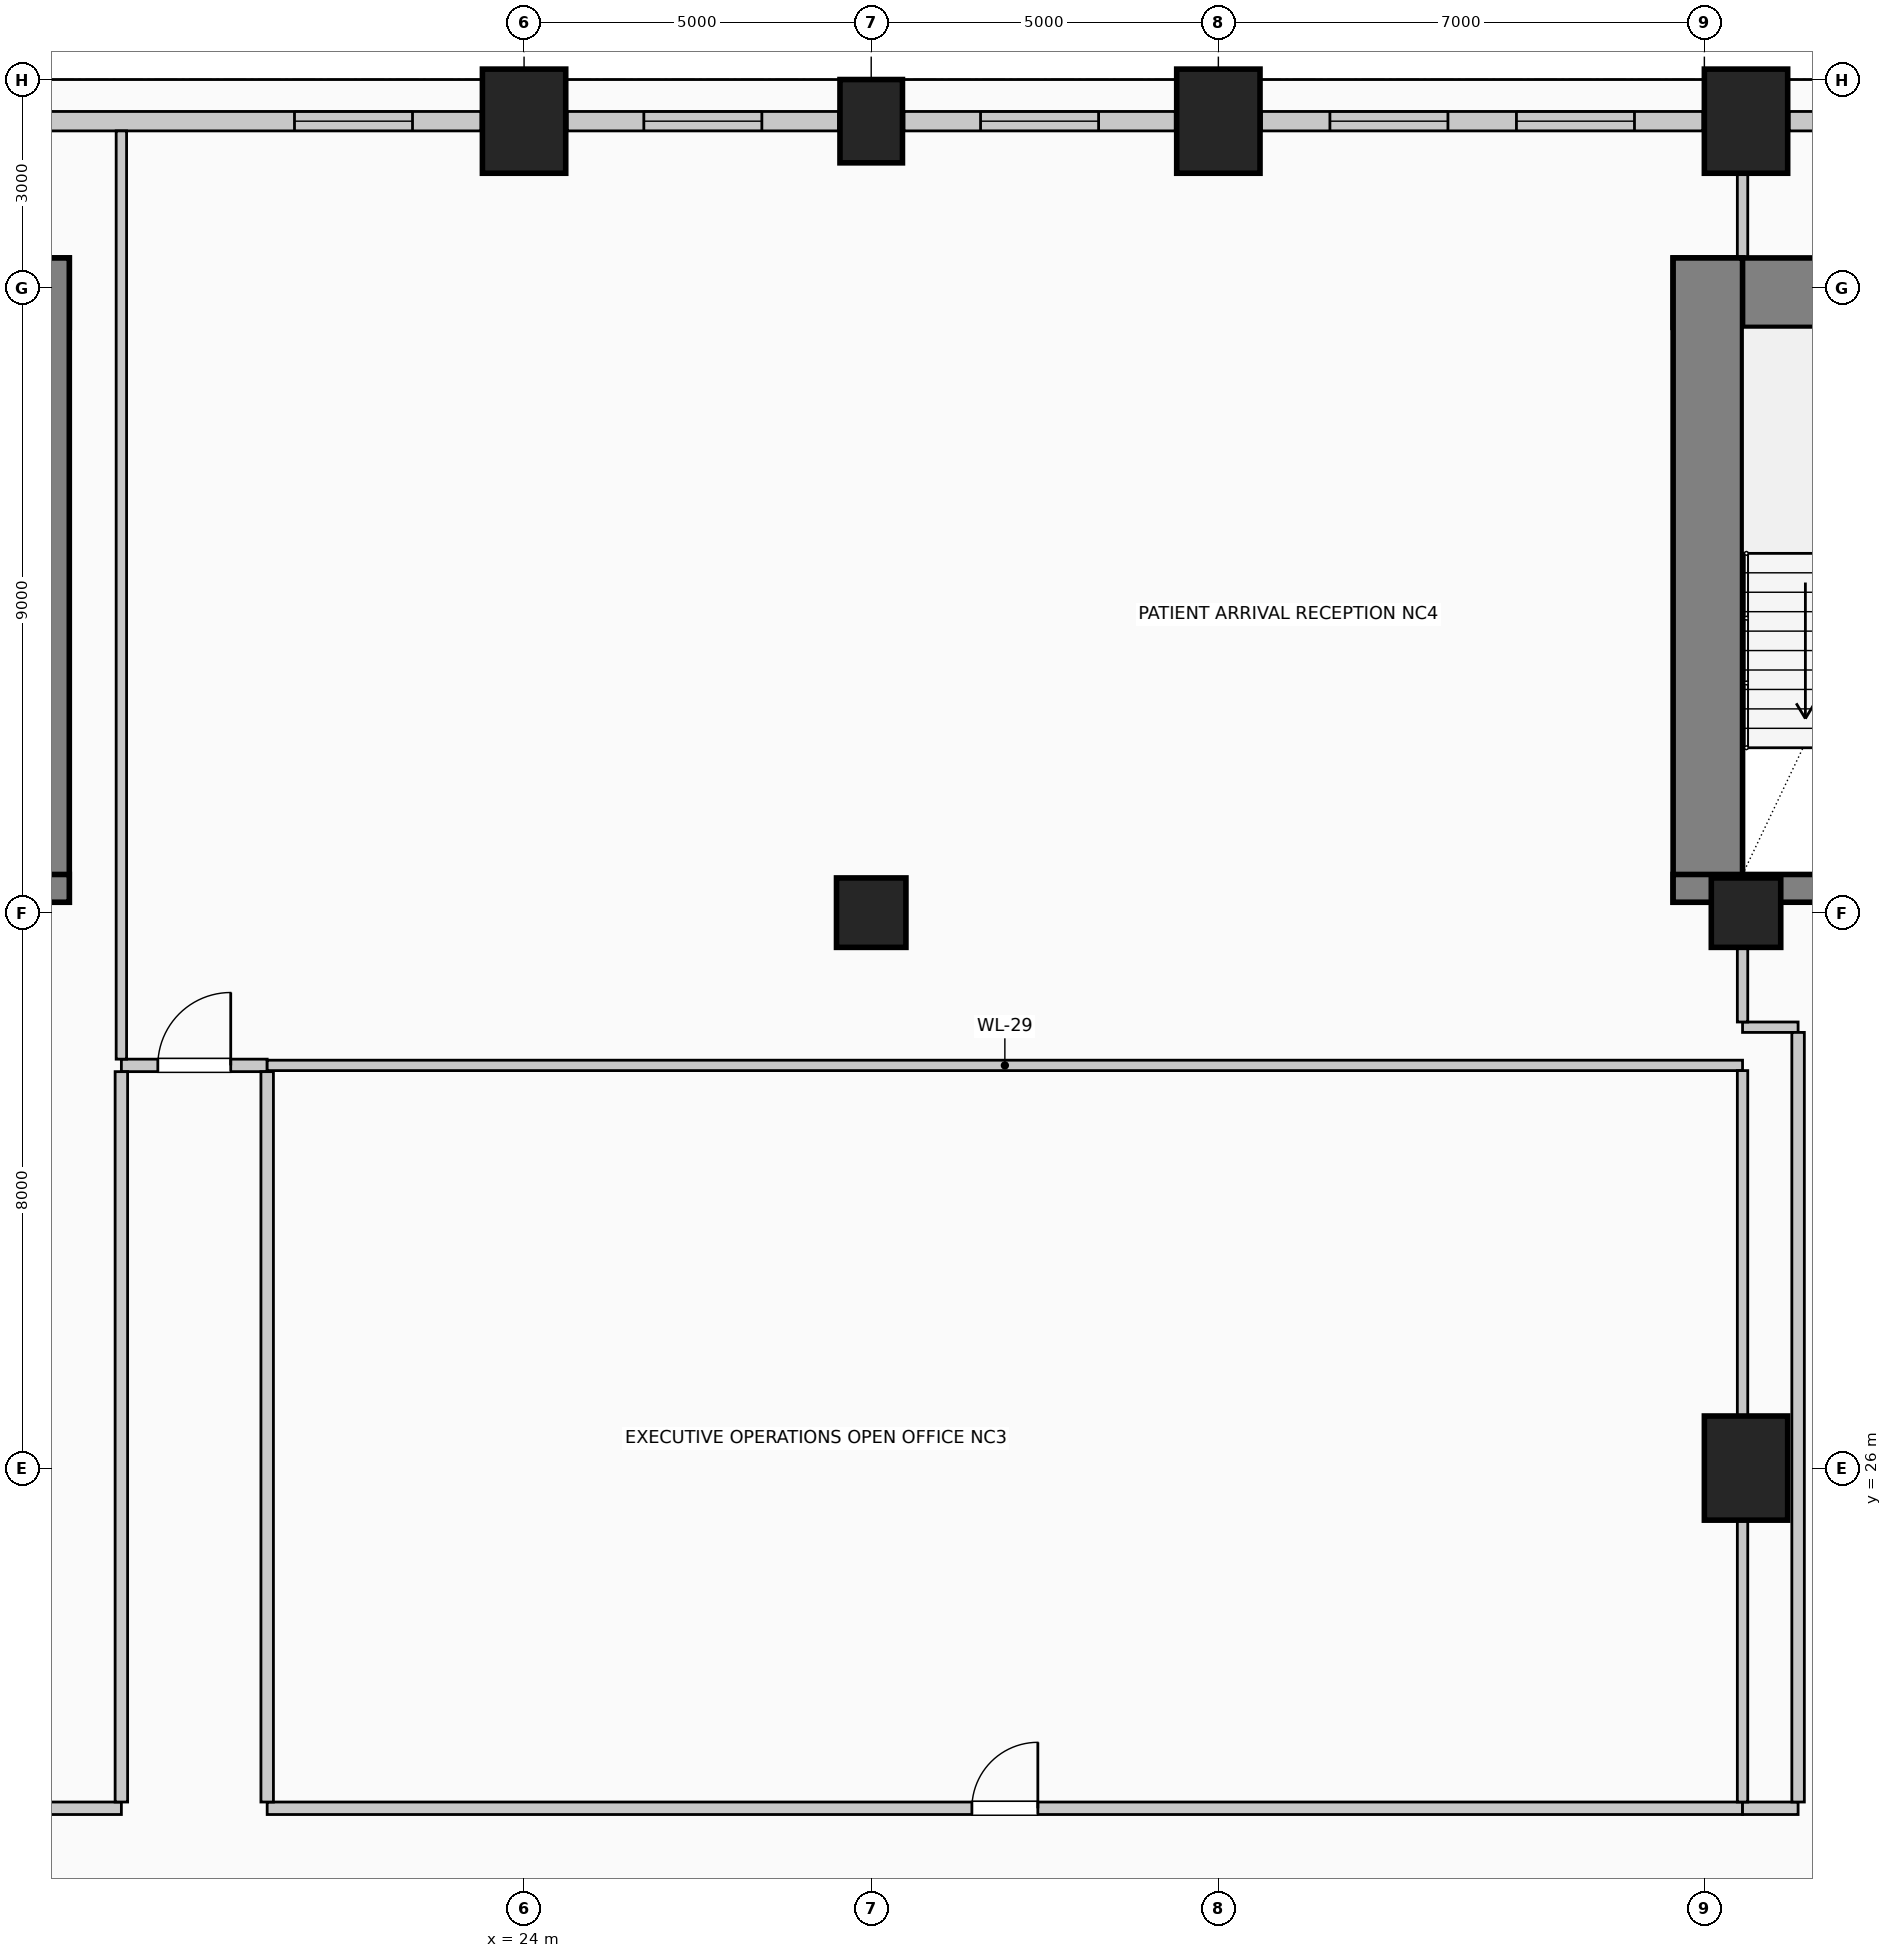
"""IFC4 building model, lengths in metres.
Left out: names, types, materials, properties, quantities, classifications, styles, units other than length and angle.
Written with IfcOpenShell. Run it as: python <this file> out.ifc"""

import sys

from ifc_helpers import new_model, si_unit, direction, frame, frame_2d, origin, origin_2d, place, context, subcontext, project, spatial, rectangle, circle, extrude, element, fill, save


model = new_model("IFC4")
c1 = context("Model", 3, precision=1e-05, world=origin(), true_north=direction((0.0, 1.0)))
c2 = subcontext(c1, "Body", "Model", "MODEL_VIEW")
j1 = project(units=[si_unit("LENGTHUNIT", "METRE"), si_unit("PLANEANGLEUNIT", "RADIAN")], contexts=[c1])
p1 = place(None, origin())
s1 = spatial("IfcSite", under=j1, at=p1, CompositionType="ELEMENT")
p2 = place(p1, origin())
s2 = spatial("IfcBuilding", under=s1, at=p2, CompositionType="ELEMENT")
p3 = place(p2, frame((0.0, 0.0, 46.6)))
s3 = spatial("IfcBuildingStorey", under=s2, at=p3, CompositionType="ELEMENT", Elevation=46.6)
p4 = place(p3, frame((2.55, 42.93, 0.0), z_axis=(0.0, 0.0, 1.0), x_axis=(1.0, 0.0, 0.0)))
e1 = element("IfcWall", 1, at=p4, inside=s3, PredefinedType="SHEAR", context=c2, shape_type="SweptSolid", body=[
    extrude(rectangle(XDim=14.9, YDim=1.0, at=frame_2d((7.45, 0.0))), origin(), (0.0, 0.0, 1.0), 4.0),
])
p5 = place(p3, frame((16.95, 34.15, 0.0), z_axis=(0.0, 0.0, 1.0), x_axis=(0.0, 1.0, 0.0)))
e2 = element("IfcWall", 2, at=p5, inside=s3, PredefinedType="SHEAR", context=c2, shape_type="SweptSolid", body=[
    extrude(rectangle(XDim=9.28, YDim=1.0, at=frame_2d((4.64, 0.0))), origin(), (0.0, 0.0, 1.0), 4.0),
])
p6 = place(p3, frame((12.29, 34.35, 0.0), z_axis=(0.0, 0.0, 1.0), x_axis=(1.0, 0.0, 0.0)))
e3 = element("IfcWall", 3, at=p6, inside=s3, PredefinedType="SHEAR", context=c2, shape_type="SweptSolid", body=[
    extrude(rectangle(XDim=5.16, YDim=0.4, at=frame_2d((2.58, 0.0))), origin(), (0.0, 0.0, 1.0), 4.0),
])
p7 = place(p6, frame((1.4, 0.0, 0.0)))
e4 = element("IfcOpeningElement", 4, at=p7, cuts=e3, PredefinedType="OPENING", context=c2, shape_type="SweptSolid", body=[
    extrude(rectangle(XDim=1.15, YDim=2.2, at=frame_2d((0.575, 1.1))), frame((0.0, 0.21, 0.0), z_axis=(0.0, -1.0, 0.0), x_axis=(1.0, 0.0, 0.0)), (0.0, 0.0, 1.0), 0.42),
])
p8 = place(p3, frame((40.55, 42.93, 0.0), z_axis=(0.0, 0.0, 1.0), x_axis=(1.0, 0.0, 0.0)))
e5 = element("IfcWall", 5, at=p8, inside=s3, PredefinedType="SHEAR", context=c2, shape_type="SweptSolid", body=[
    extrude(rectangle(XDim=14.9, YDim=1.0, at=frame_2d((7.45, 0.0))), origin(), (0.0, 0.0, 1.0), 4.0),
])
p9 = place(p3, frame((41.05, 34.15, 0.0), z_axis=(0.0, 0.0, 1.0), x_axis=(0.0, 1.0, 0.0)))
e6 = element("IfcWall", 6, at=p9, inside=s3, PredefinedType="SHEAR", context=c2, shape_type="SweptSolid", body=[
    extrude(rectangle(XDim=9.28, YDim=1.0, at=frame_2d((4.64, 0.0))), origin(), (0.0, 0.0, 1.0), 4.0),
])
p10 = place(p3, frame((40.55, 34.35, 0.0), z_axis=(0.0, 0.0, 1.0), x_axis=(1.0, 0.0, 0.0)))
e7 = element("IfcWall", 7, at=p10, inside=s3, PredefinedType="SHEAR", context=c2, shape_type="SweptSolid", body=[
    extrude(rectangle(XDim=5.16, YDim=0.4, at=frame_2d((2.58, 0.0))), origin(), (0.0, 0.0, 1.0), 4.0),
])
p11 = place(p10, frame((2.4, 0.0, 0.0)))
e8 = element("IfcOpeningElement", 8, at=p11, cuts=e7, PredefinedType="OPENING", context=c2, shape_type="SweptSolid", body=[
    extrude(rectangle(XDim=1.15, YDim=2.2, at=frame_2d((0.575, 1.1))), frame((0.0, 0.21, 0.0), z_axis=(0.0, -1.0, 0.0), x_axis=(1.0, 0.0, 0.0)), (0.0, 0.0, 1.0), 0.42),
])
p12 = place(p3, frame((24.0, 45.4, 0.0), z_axis=(0.0, 0.0, 1.0), x_axis=(1.0, 0.0, 0.0)))
e9 = element("IfcColumn", 9, at=p12, inside=s3, PredefinedType="COLUMN", context=c2, shape_type="SweptSolid", body=[
    extrude(rectangle(XDim=1.2, YDim=1.5, at=origin_2d()), origin(), (0.0, 0.0, 1.0), 4.0),
])
p13 = place(p3, frame((29.0, 45.4, 0.0), z_axis=(0.0, 0.0, 1.0), x_axis=(1.0, 0.0, 0.0)))
e10 = element("IfcColumn", 10, at=p13, inside=s3, PredefinedType="COLUMN", context=c2, shape_type="SweptSolid", body=[
    extrude(rectangle(XDim=0.9, YDim=1.2, at=origin_2d()), origin(), (0.0, 0.0, 1.0), 4.0),
])
for number, where, z_axis, x_axis in (
    (11, (34.0, 45.4, 0.0), (0.0, 0.0, 1.0), (1.0, 0.0, 0.0)),
    (12, (41.6, 45.4, 0.0), (0.0, 0.0, 1.0), (1.0, 0.0, 0.0)),
    (13, (41.6, 26.0, 0.0), (0.0, 0.0, 1.0), (1.0, 0.0, 0.0)),
):
    element("IfcColumn", number, at=place(p3, frame(where, z_axis=z_axis, x_axis=x_axis)), inside=s3, PredefinedType="COLUMN", context=c2, shape_type="SweptSolid", body=[
        extrude(rectangle(XDim=1.2, YDim=1.5, at=origin_2d()), origin(), (0.0, 0.0, 1.0), 4.0),
    ])
for number, where, z_axis, x_axis in (
    (14, (29.0, 34.0, 0.0), (0.0, 0.0, 1.0), (1.0, 0.0, 0.0)),
    (15, (41.6, 34.0, 0.0), (0.0, 0.0, 1.0), (1.0, 0.0, 0.0)),
):
    element("IfcColumn", number, at=place(p3, frame(where, z_axis=z_axis, x_axis=x_axis)), inside=s3, PredefinedType="COLUMN", context=c2, shape_type="SweptSolid", body=[
        extrude(circle(Radius=0.5, at=origin_2d()), origin(), (0.0, 0.0, 1.0), 4.0),
    ])
p14 = place(p3, frame((17.02, 45.4, 0.0), z_axis=(0.0, 0.0, 1.0), x_axis=(1.0, 0.0, 0.0)))
e16 = element("IfcWall", 16, at=p14, inside=s3, PredefinedType="SOLIDWALL", context=c2, shape_type="SweptSolid", body=[
    extrude(rectangle(XDim=6.36, YDim=0.28, at=frame_2d((3.18, 0.0))), origin(), (0.0, 0.0, 1.0), 2.85),
])
p15 = place(p14, frame((3.673, 0.0, 0.5)))
e17 = element("IfcOpeningElement", 17, at=p15, cuts=e16, PredefinedType="OPENING", context=c2, shape_type="SweptSolid", body=[
    extrude(rectangle(XDim=1.7, YDim=1.95, at=frame_2d((0.85, 0.975))), frame((0.0, 0.15, 0.0), z_axis=(0.0, -1.0, 0.0), x_axis=(1.0, 0.0, 0.0)), (0.0, 0.0, 1.0), 0.3),
])
p16 = place(p3, frame((24.62, 45.4, 0.0), z_axis=(0.0, 0.0, 1.0), x_axis=(1.0, 0.0, 0.0)))
e18 = element("IfcWall", 18, at=p16, inside=s3, PredefinedType="SOLIDWALL", context=c2, shape_type="SweptSolid", body=[
    extrude(rectangle(XDim=3.91, YDim=0.28, at=frame_2d((1.955, 0.0))), origin(), (0.0, 0.0, 1.0), 2.85),
])
p17 = place(p16, frame((1.105, 0.0, 0.5)))
e19 = element("IfcOpeningElement", 19, at=p17, cuts=e18, PredefinedType="OPENING", context=c2, shape_type="SweptSolid", body=[
    extrude(rectangle(XDim=1.7, YDim=1.95, at=frame_2d((0.85, 0.975))), frame((0.0, 0.15, 0.0), z_axis=(0.0, -1.0, 0.0), x_axis=(1.0, 0.0, 0.0)), (0.0, 0.0, 1.0), 0.3),
])
p18 = place(p3, frame((29.47, 45.4, 0.0), z_axis=(0.0, 0.0, 1.0), x_axis=(1.0, 0.0, 0.0)))
e20 = element("IfcWall", 20, at=p18, inside=s3, PredefinedType="SOLIDWALL", context=c2, shape_type="SweptSolid", body=[
    extrude(rectangle(XDim=3.91, YDim=0.28, at=frame_2d((1.955, 0.0))), origin(), (0.0, 0.0, 1.0), 2.85),
])
p19 = place(p18, frame((1.105, 0.0, 0.5)))
e21 = element("IfcOpeningElement", 21, at=p19, cuts=e20, PredefinedType="OPENING", context=c2, shape_type="SweptSolid", body=[
    extrude(rectangle(XDim=1.7, YDim=1.95, at=frame_2d((0.85, 0.975))), frame((0.0, 0.15, 0.0), z_axis=(0.0, -1.0, 0.0), x_axis=(1.0, 0.0, 0.0)), (0.0, 0.0, 1.0), 0.3),
])
p20 = place(p3, frame((34.62, 45.4, 0.0), z_axis=(0.0, 0.0, 1.0), x_axis=(1.0, 0.0, 0.0)))
e22 = element("IfcWall", 22, at=p20, inside=s3, PredefinedType="SOLIDWALL", context=c2, shape_type="SweptSolid", body=[
    extrude(rectangle(XDim=6.36, YDim=0.28, at=frame_2d((3.18, 0.0))), origin(), (0.0, 0.0, 1.0), 2.85),
])
p21 = place(p20, frame((0.987, 0.0, 0.5)))
e23 = element("IfcOpeningElement", 23, at=p21, cuts=e22, PredefinedType="OPENING", context=c2, shape_type="SweptSolid", body=[
    extrude(rectangle(XDim=1.7, YDim=1.95, at=frame_2d((0.85, 0.975))), frame((0.0, 0.15, 0.0), z_axis=(0.0, -1.0, 0.0), x_axis=(1.0, 0.0, 0.0)), (0.0, 0.0, 1.0), 0.3),
])
p22 = place(p20, frame((3.673, 0.0, 0.5)))
e24 = element("IfcOpeningElement", 24, at=p22, cuts=e22, PredefinedType="OPENING", context=c2, shape_type="SweptSolid", body=[
    extrude(rectangle(XDim=1.7, YDim=1.95, at=frame_2d((0.85, 0.975))), frame((0.0, 0.15, 0.0), z_axis=(0.0, -1.0, 0.0), x_axis=(1.0, 0.0, 0.0)), (0.0, 0.0, 1.0), 0.3),
])
p23 = place(p3, frame((42.22, 45.4, 0.0), z_axis=(0.0, 0.0, 1.0), x_axis=(1.0, 0.0, 0.0)))
e25 = element("IfcWall", 25, at=p23, inside=s3, PredefinedType="SOLIDWALL", context=c2, shape_type="SweptSolid", body=[
    extrude(rectangle(XDim=1.31, YDim=0.28, at=frame_2d((0.655, 0.0))), origin(), (0.0, 0.0, 1.0), 2.85),
])
p24 = place(p3, frame((12.2, 21.1, 0.0), z_axis=(0.0, 0.0, 1.0), x_axis=(1.0, 0.0, 0.0)))
e26 = element("IfcWall", 26, at=p24, inside=s3, PredefinedType="PARTITIONING", context=c2, shape_type="SweptSolid", body=[
    extrude(rectangle(XDim=6.0, YDim=0.18, at=frame_2d((3.0, 0.0))), origin(), (0.0, 0.0, 1.0), 3.7),
])
p25 = place(p3, frame((20.3, 21.1, 0.0), z_axis=(0.0, 0.0, 1.0), x_axis=(1.0, 0.0, 0.0)))
e27 = element("IfcWall", 27, at=p25, inside=s3, PredefinedType="PARTITIONING", context=c2, shape_type="SweptSolid", body=[
    extrude(rectangle(XDim=21.25, YDim=0.18, at=frame_2d((10.625, 0.0))), origin(), (0.0, 0.0, 1.0), 3.7),
])
p26 = place(p25, frame((10.15, 0.0, 0.0)))
e28 = element("IfcOpeningElement", 28, at=p26, cuts=e27, PredefinedType="OPENING", context=c2, shape_type="SweptSolid", body=[
    extrude(rectangle(XDim=0.95, YDim=2.15, at=frame_2d((0.475, 1.075))), frame((0.0, 0.1, 0.0), z_axis=(0.0, -1.0, 0.0), x_axis=(1.0, 0.0, 0.0)), (0.0, 0.0, 1.0), 0.2),
])
p27 = place(p3, frame((41.55, 21.1, 0.0), z_axis=(0.0, 0.0, 1.0), x_axis=(1.0, 0.0, 0.0)))
e29 = element("IfcWall", 29, at=p27, inside=s3, PredefinedType="PARTITIONING", context=c2, shape_type="SweptSolid", body=[
    extrude(rectangle(XDim=0.8, YDim=0.18, at=frame_2d((0.4, 0.0))), origin(), (0.0, 0.0, 1.0), 3.7),
])
p28 = place(p3, frame((18.2, 31.8, 0.0), z_axis=(0.0, 0.0, 1.0), x_axis=(1.0, 0.0, 0.0)))
e30 = element("IfcWall", 30, at=p28, inside=s3, PredefinedType="PARTITIONING", context=c2, shape_type="SweptSolid", body=[
    extrude(rectangle(XDim=2.1, YDim=0.18, at=frame_2d((1.05, 0.0))), origin(), (0.0, 0.0, 1.0), 3.7),
])
p29 = place(p28, frame((0.525, 0.0, 0.0)))
e31 = element("IfcOpeningElement", 31, at=p29, cuts=e30, PredefinedType="OPENING", context=c2, shape_type="SweptSolid", body=[
    extrude(rectangle(XDim=1.05, YDim=2.15, at=frame_2d((0.525, 1.075))), frame((0.0, 0.1, 0.0), z_axis=(0.0, -1.0, 0.0), x_axis=(1.0, 0.0, 0.0)), (0.0, 0.0, 1.0), 0.2),
])
p30 = place(p3, frame((20.3, 31.8, 0.0), z_axis=(0.0, 0.0, 1.0), x_axis=(1.0, 0.0, 0.0)))
e32 = element("IfcWall", 32, at=p30, inside=s3, PredefinedType="PARTITIONING", context=c2, shape_type="SweptSolid", body=[
    extrude(rectangle(XDim=21.25, YDim=0.15, at=frame_2d((10.625, 0.0))), origin(), (0.0, 0.0, 1.0), 3.7),
])
p31 = place(p3, frame((41.55, 32.35, 0.0), z_axis=(0.0, 0.0, 1.0), x_axis=(1.0, 0.0, 0.0)))
e33 = element("IfcWall", 33, at=p31, inside=s3, PredefinedType="PARTITIONING", context=c2, shape_type="SweptSolid", body=[
    extrude(rectangle(XDim=0.8, YDim=0.15, at=frame_2d((0.4, 0.0))), origin(), (0.0, 0.0, 1.0), 3.7),
])
p32 = place(p3, frame((18.2, 21.19, 0.0), z_axis=(0.0, 0.0, 1.0), x_axis=(0.0, 1.0, 0.0)))
e34 = element("IfcWall", 34, at=p32, inside=s3, PredefinedType="PARTITIONING", context=c2, shape_type="SweptSolid", body=[
    extrude(rectangle(XDim=10.52, YDim=0.18, at=frame_2d((5.26, 0.0))), origin(), (0.0, 0.0, 1.0), 3.7),
])
p33 = place(p3, frame((18.2, 31.89, 0.0), z_axis=(0.0, 0.0, 1.0), x_axis=(0.0, 1.0, 0.0)))
e35 = element("IfcWall", 35, at=p33, inside=s3, PredefinedType="PARTITIONING", context=c2, shape_type="SweptSolid", body=[
    extrude(rectangle(XDim=13.37, YDim=0.15, at=frame_2d((6.685, 0.0))), origin(), (0.0, 0.0, 1.0), 3.7),
])
p34 = place(p3, frame((20.3, 21.19, 0.0), z_axis=(0.0, 0.0, 1.0), x_axis=(0.0, 1.0, 0.0)))
e36 = element("IfcWall", 36, at=p34, inside=s3, PredefinedType="PARTITIONING", context=c2, shape_type="SweptSolid", body=[
    extrude(rectangle(XDim=10.52, YDim=0.18, at=frame_2d((5.26, 0.0))), origin(), (0.0, 0.0, 1.0), 3.7),
])
p35 = place(p3, frame((41.55, 21.19, 0.0), z_axis=(0.0, 0.0, 1.0), x_axis=(0.0, 1.0, 0.0)))
e37 = element("IfcWall", 37, at=p35, inside=s3, PredefinedType="PARTITIONING", context=c2, shape_type="SweptSolid", body=[
    extrude(rectangle(XDim=4.06, YDim=0.15, at=frame_2d((2.03, 0.0))), origin(), (0.0, 0.0, 1.0), 2.995),
])
p36 = place(p3, frame((41.55, 26.75, 0.0), z_axis=(0.0, 0.0, 1.0), x_axis=(0.0, 1.0, 0.0)))
e38 = element("IfcWall", 38, at=p36, inside=s3, PredefinedType="PARTITIONING", context=c2, shape_type="SweptSolid", body=[
    extrude(rectangle(XDim=4.975, YDim=0.15, at=frame_2d((2.488, 0.0))), origin(), (0.0, 0.0, 1.0), 2.995),
])
p37 = place(p3, frame((41.55, 32.425, 0.0), z_axis=(0.0, 0.0, 1.0), x_axis=(0.0, 1.0, 0.0)))
e39 = element("IfcWall", 39, at=p37, inside=s3, PredefinedType="PARTITIONING", context=c2, shape_type="SweptSolid", body=[
    extrude(rectangle(XDim=1.075, YDim=0.15, at=frame_2d((0.538, 0.0))), origin(), (0.0, 0.0, 1.0), 2.995),
])
p38 = place(p3, frame((41.55, 43.43, 0.0), z_axis=(0.0, 0.0, 1.0), x_axis=(0.0, 1.0, 0.0)))
e40 = element("IfcWall", 40, at=p38, inside=s3, PredefinedType="PARTITIONING", context=c2, shape_type="SweptSolid", body=[
    extrude(rectangle(XDim=1.22, YDim=0.15, at=frame_2d((0.61, 0.0))), origin(), (0.0, 0.0, 1.0), 3.7),
])
p39 = place(p3, frame((42.35, 21.19, 0.0), z_axis=(0.0, 0.0, 1.0), x_axis=(0.0, 1.0, 0.0)))
e41 = element("IfcWall", 41, at=p39, inside=s3, PredefinedType="PARTITIONING", context=c2, shape_type="SweptSolid", body=[
    extrude(rectangle(XDim=11.085, YDim=0.18, at=frame_2d((5.542, 0.0))), origin(), (0.0, 0.0, 1.0), 3.7),
])
p40 = place(p15, origin())
e42 = element("IfcWindow", 42, at=p40, inside=s3, PartitioningType="SINGLE_PANEL", PredefinedType="WINDOW", context=c2, shape_type="SweptSolid", body=[
    extrude(rectangle(XDim=1.7, YDim=1.95, at=frame_2d((0.85, 0.975))), frame((0.0, 0.03, 0.0), z_axis=(0.0, -1.0, 0.0), x_axis=(1.0, 0.0, 0.0)), (0.0, 0.0, 1.0), 0.06),
])
fill(e17, e42)
p41 = place(p17, origin())
e43 = element("IfcWindow", 43, at=p41, inside=s3, PartitioningType="SINGLE_PANEL", PredefinedType="WINDOW", context=c2, shape_type="SweptSolid", body=[
    extrude(rectangle(XDim=1.7, YDim=1.95, at=frame_2d((0.85, 0.975))), frame((0.0, 0.03, 0.0), z_axis=(0.0, -1.0, 0.0), x_axis=(1.0, 0.0, 0.0)), (0.0, 0.0, 1.0), 0.06),
])
fill(e19, e43)
p42 = place(p19, origin())
e44 = element("IfcWindow", 44, at=p42, inside=s3, PartitioningType="SINGLE_PANEL", PredefinedType="WINDOW", context=c2, shape_type="SweptSolid", body=[
    extrude(rectangle(XDim=1.7, YDim=1.95, at=frame_2d((0.85, 0.975))), frame((0.0, 0.03, 0.0), z_axis=(0.0, -1.0, 0.0), x_axis=(1.0, 0.0, 0.0)), (0.0, 0.0, 1.0), 0.06),
])
fill(e21, e44)
p43 = place(p21, origin())
e45 = element("IfcWindow", 45, at=p43, inside=s3, PartitioningType="SINGLE_PANEL", PredefinedType="WINDOW", context=c2, shape_type="SweptSolid", body=[
    extrude(rectangle(XDim=1.7, YDim=1.95, at=frame_2d((0.85, 0.975))), frame((0.0, 0.03, 0.0), z_axis=(0.0, -1.0, 0.0), x_axis=(1.0, 0.0, 0.0)), (0.0, 0.0, 1.0), 0.06),
])
fill(e23, e45)
p44 = place(p22, origin())
e46 = element("IfcWindow", 46, at=p44, inside=s3, PartitioningType="SINGLE_PANEL", PredefinedType="WINDOW", context=c2, shape_type="SweptSolid", body=[
    extrude(rectangle(XDim=1.7, YDim=1.95, at=frame_2d((0.85, 0.975))), frame((0.0, 0.03, 0.0), z_axis=(0.0, -1.0, 0.0), x_axis=(1.0, 0.0, 0.0)), (0.0, 0.0, 1.0), 0.06),
])
fill(e24, e46)
p45 = place(p26, origin())
e47 = element("IfcDoor", 47, at=p45, inside=s3, OperationType="SINGLE_SWING_RIGHT", PredefinedType="DOOR", context=c2, shape_type="SweptSolid", body=[
    extrude(rectangle(XDim=0.95, YDim=2.15, at=frame_2d((0.475, 1.075))), frame((0.0, 0.025, 0.0), z_axis=(0.0, -1.0, 0.0), x_axis=(1.0, 0.0, 0.0)), (0.0, 0.0, 1.0), 0.05),
])
fill(e28, e47)
p46 = place(p29, origin())
e48 = element("IfcDoor", 48, at=p46, inside=s3, OperationType="SINGLE_SWING_RIGHT", PredefinedType="DOOR", context=c2, shape_type="SweptSolid", body=[
    extrude(rectangle(XDim=1.05, YDim=2.15, at=frame_2d((0.525, 1.075))), frame((0.0, 0.025, 0.0), z_axis=(0.0, -1.0, 0.0), x_axis=(1.0, 0.0, 0.0)), (0.0, 0.0, 1.0), 0.05),
])
fill(e31, e48)
save(model, sys.argv[1])
